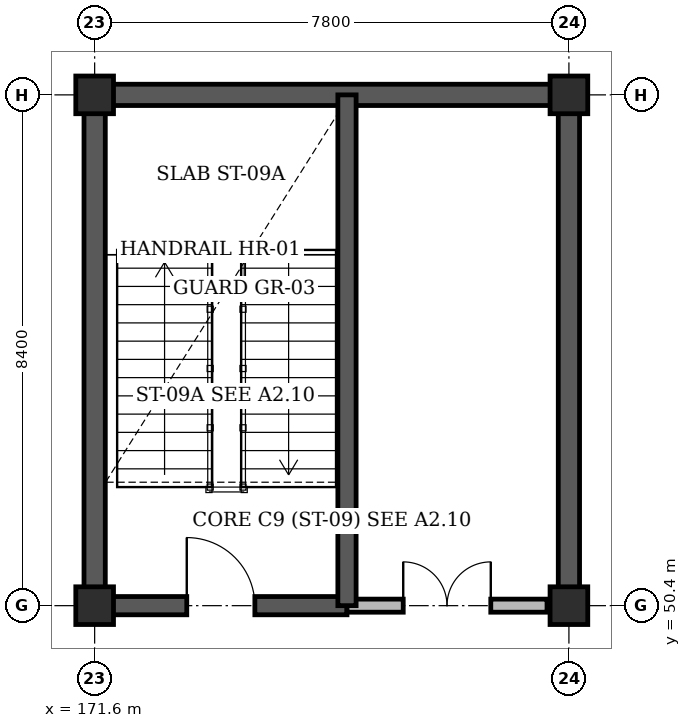
"""IFC4 building model, lengths in metres.
Left out: names, types, materials, properties, quantities, classifications, styles, units other than length and angle.
Written with IfcOpenShell. Run it as: python <this file> out.ifc"""

import sys

from ifc_helpers import new_model, si_unit, direction, frame, frame_2d, origin, origin_2d, place, context, subcontext, project, spatial, rectangle, extrude, element, fill, save


model = new_model("IFC4")
c1 = context("Model", 3, precision=1e-05, world=origin(), true_north=direction((0.0, 1.0)))
c2 = subcontext(c1, "Body", "Model", "MODEL_VIEW")
j1 = project(units=[si_unit("LENGTHUNIT", "METRE"), si_unit("PLANEANGLEUNIT", "RADIAN")], contexts=[c1])
p1 = place(None, origin())
s1 = spatial("IfcSite", under=j1, at=p1, CompositionType="ELEMENT")
p2 = place(p1, origin())
s2 = spatial("IfcBuilding", under=s1, at=p2, CompositionType="ELEMENT")
p3 = place(p2, frame((0.0, 0.0, 9.6)))
s3 = spatial("IfcBuildingStorey", under=s2, at=p3, CompositionType="ELEMENT", Elevation=9.6)
p4 = place(p3, frame((171.425, 58.8, 0.0), z_axis=(0.0, 0.0, 1.0), x_axis=(1.0, 0.0, 0.0)))
e1 = element("IfcWall", 1, at=p4, inside=s3, PredefinedType="SHEAR", context=c2, shape_type="SweptSolid", body=[
    extrude(rectangle(XDim=8.15, YDim=0.35, at=frame_2d((4.075, 0.0))), origin(), (0.0, 0.0, 1.0), 4.48),
])
for number, where, z_axis, x_axis in (
    (2, (171.6, 50.4, 0.0), (0.0, 0.0, 1.0), (0.0, 1.0, 0.0)),
    (3, (179.4, 50.4, 0.0), (0.0, 0.0, 1.0), (0.0, 1.0, 0.0)),
):
    element("IfcWall", number, at=place(p3, frame(where, z_axis=z_axis, x_axis=x_axis)), inside=s3, PredefinedType="SHEAR", context=c2, shape_type="SweptSolid", body=[
        extrude(rectangle(XDim=8.4, YDim=0.35, at=frame_2d((4.2, 0.0))), origin(), (0.0, 0.0, 1.0), 4.48),
    ])
for number, where, z_axis, x_axis in (
    (4, (171.6, 50.4, 0.0), (0.0, 0.0, 1.0), (1.0, 0.0, 0.0)),
    (5, (171.6, 58.8, 0.0), (0.0, 0.0, 1.0), (1.0, 0.0, 0.0)),
    (6, (179.4, 50.4, 0.0), (0.0, 0.0, 1.0), (1.0, 0.0, 0.0)),
    (7, (179.4, 58.8, 0.0), (0.0, 0.0, 1.0), (1.0, 0.0, 0.0)),
):
    element("IfcColumn", number, at=place(p3, frame(where, z_axis=z_axis, x_axis=x_axis)), inside=s3, PredefinedType="COLUMN", context=c2, shape_type="SweptSolid", body=[
        extrude(rectangle(XDim=0.62, YDim=0.62, at=origin_2d()), origin(), (0.0, 0.0, 1.0), 4.8),
    ])
p5 = place(p3, frame((171.6, 50.4, 0.0), z_axis=(0.0, 0.0, 1.0), x_axis=(1.0, 0.0, 0.0)))
e8 = element("IfcWall", 8, at=p5, inside=s3, PredefinedType="SHEAR", context=c2, shape_type="SweptSolid", body=[
    extrude(rectangle(XDim=4.15, YDim=0.3, at=frame_2d((2.075, 0.0))), origin(), (0.0, 0.0, 1.0), 4.8),
])
p6 = place(p5, frame((1.515, 0.0, 0.0)))
e9 = element("IfcOpeningElement", 9, at=p6, cuts=e8, PredefinedType="OPENING", context=c2, shape_type="SweptSolid", body=[
    extrude(rectangle(XDim=1.12, YDim=2.15, at=frame_2d((0.56, 1.075))), frame((0.0, 0.16, 0.0), z_axis=(0.0, -1.0, 0.0), x_axis=(1.0, 0.0, 0.0)), (0.0, 0.0, 1.0), 0.32),
])
p7 = place(p3, frame((175.75, 50.4, 0.0), z_axis=(0.0, 0.0, 1.0), x_axis=(1.0, 0.0, 0.0)))
e10 = element("IfcWall", 10, at=p7, inside=s3, PredefinedType="STANDARD", context=c2, shape_type="SweptSolid", body=[
    extrude(rectangle(XDim=3.29, YDim=0.215, at=frame_2d((1.645, 0.0))), origin(), (0.0, 0.0, 1.0), 3.73),
])
p8 = place(p7, frame((0.925, 0.0, 0.0)))
e11 = element("IfcOpeningElement", 11, at=p8, cuts=e10, PredefinedType="OPENING", context=c2, shape_type="SweptSolid", body=[
    extrude(rectangle(XDim=1.44, YDim=2.2, at=frame_2d((0.72, 1.1))), frame((0.0, 0.118, 0.0), z_axis=(0.0, -1.0, 0.0), x_axis=(1.0, 0.0, 0.0)), (0.0, 0.0, 1.0), 0.235),
])
p9 = place(p3, frame((175.75, 50.4, 0.0), z_axis=(0.0, 0.0, 1.0), x_axis=(0.0, 1.0, 0.0)))
e12 = element("IfcWall", 12, at=p9, inside=s3, PredefinedType="SHEAR", context=c2, shape_type="SweptSolid", body=[
    extrude(rectangle(XDim=8.4, YDim=0.3, at=frame_2d((4.2, 0.0))), origin(), (0.0, 0.0, 1.0), 4.8),
])
p10 = place(p6, origin())
e13 = element("IfcDoor", 13, at=p10, inside=s3, OperationType="SINGLE_SWING_LEFT", PredefinedType="DOOR", context=c2, shape_type="SweptSolid", body=[
    extrude(rectangle(XDim=1.12, YDim=2.15, at=frame_2d((0.56, 1.075))), frame((0.0, 0.025, 0.0), z_axis=(0.0, -1.0, 0.0), x_axis=(1.0, 0.0, 0.0)), (0.0, 0.0, 1.0), 0.05),
])
fill(e9, e13)
p11 = place(p8, origin())
e14 = element("IfcDoor", 14, at=p11, inside=s3, OperationType="DOUBLE_DOOR_SINGLE_SWING", PredefinedType="DOOR", context=c2, shape_type="SweptSolid", body=[
    extrude(rectangle(XDim=1.44, YDim=2.2, at=frame_2d((0.72, 1.1))), frame((0.0, 0.025, 0.0), z_axis=(0.0, -1.0, 0.0), x_axis=(1.0, 0.0, 0.0)), (0.0, 0.0, 1.0), 0.05),
])
fill(e11, e14)
save(model, sys.argv[1])
